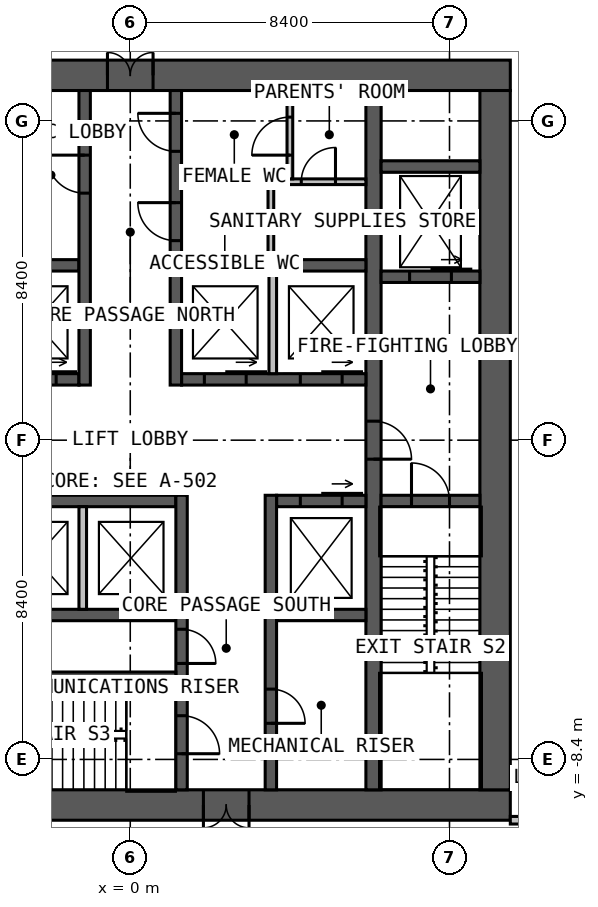
"""IFC4 building model, lengths in metres.
Left out: names, types, materials, properties, quantities, classifications, styles, units other than length and angle.
Written with IfcOpenShell. Run it as: python <this file> out.ifc"""

import sys

from ifc_helpers import new_model, si_unit, direction, frame, frame_2d, origin, place, context, subcontext, project, spatial, rectangle, extrude, element, fill, save


model = new_model("IFC4")
c1 = context("Model", 3, precision=1e-05, world=origin(), true_north=direction((0.0, 1.0)))
c2 = subcontext(c1, "Body", "Model", "MODEL_VIEW")
j1 = project(units=[si_unit("LENGTHUNIT", "METRE"), si_unit("PLANEANGLEUNIT", "RADIAN")], contexts=[c1])
p1 = place(None, origin())
s1 = spatial("IfcSite", under=j1, at=p1, CompositionType="ELEMENT")
p2 = place(p1, origin())
s2 = spatial("IfcBuilding", under=s1, at=p2, CompositionType="ELEMENT")
p3 = place(p2, frame((0.0, 0.0, 69.0)))
s3 = spatial("IfcBuildingStorey", under=s2, at=p3, CompositionType="ELEMENT", Elevation=69.0)
p4 = place(p3, frame((-10.0, 9.6, 0.0), z_axis=(0.0, 0.0, 1.0), x_axis=(1.0, 0.0, 0.0)))
e1 = element("IfcWall", 1, at=p4, inside=s3, PredefinedType="SOLIDWALL", context=c2, shape_type="SweptSolid", body=[
    extrude(rectangle(XDim=20.0, YDim=0.8, at=frame_2d((10.0, 0.0))), origin(), (0.0, 0.0, 1.0), 4.0),
])
p5 = place(p4, frame((9.4, 0.0, 0.0)))
e2 = element("IfcOpeningElement", 2, at=p5, cuts=e1, PredefinedType="OPENING", context=c2, shape_type="SweptSolid", body=[
    extrude(rectangle(XDim=1.2, YDim=2.2, at=frame_2d((0.6, 1.1))), frame((0.0, 0.41, 0.0), z_axis=(0.0, -1.0, 0.0), x_axis=(1.0, 0.0, 0.0)), (0.0, 0.0, 1.0), 0.82),
])
p6 = place(p3, frame((10.0, -9.6, 0.0), z_axis=(0.0, 0.0, 1.0), x_axis=(-1.0, 0.0, 0.0)))
e3 = element("IfcWall", 3, at=p6, inside=s3, PredefinedType="SOLIDWALL", context=c2, shape_type="SweptSolid", body=[
    extrude(rectangle(XDim=20.0, YDim=0.8, at=frame_2d((10.0, 0.0))), origin(), (0.0, 0.0, 1.0), 4.0),
])
p7 = place(p6, frame((6.875, 0.0, 0.0)))
e4 = element("IfcOpeningElement", 4, at=p7, cuts=e3, PredefinedType="OPENING", context=c2, shape_type="SweptSolid", body=[
    extrude(rectangle(XDim=1.2, YDim=2.2, at=frame_2d((0.6, 1.1))), frame((0.0, 0.41, 0.0), z_axis=(0.0, -1.0, 0.0), x_axis=(1.0, 0.0, 0.0)), (0.0, 0.0, 1.0), 0.82),
])
p8 = place(p3, frame((9.6, -9.2, 0.0), z_axis=(0.0, 0.0, 1.0), x_axis=(0.0, 1.0, 0.0)))
e5 = element("IfcWall", 5, at=p8, inside=s3, PredefinedType="SOLIDWALL", context=c2, shape_type="SweptSolid", body=[
    extrude(rectangle(XDim=18.4, YDim=0.8, at=frame_2d((9.2, 0.0))), origin(), (0.0, 0.0, 1.0), 4.0),
])
p9 = place(p3, frame((6.4, 9.2, 0.0), z_axis=(0.0, 0.0, 1.0), x_axis=(0.0, -1.0, 0.0)))
e6 = element("IfcWall", 6, at=p9, inside=s3, PredefinedType="SOLIDWALL", context=c2, shape_type="SweptSolid", body=[
    extrude(rectangle(XDim=18.4, YDim=0.4, at=frame_2d((9.2, 0.0))), origin(), (0.0, 0.0, 1.0), 4.0),
])
p10 = place(p9, frame((8.7, 0.0, 0.0)))
e7 = element("IfcOpeningElement", 7, at=p10, cuts=e6, PredefinedType="OPENING", context=c2, shape_type="SweptSolid", body=[
    extrude(rectangle(XDim=1.0, YDim=2.2, at=frame_2d((0.5, 1.1))), frame((0.0, 0.21, 0.0), z_axis=(0.0, -1.0, 0.0), x_axis=(1.0, 0.0, 0.0)), (0.0, 0.0, 1.0), 0.42),
])
p11 = place(p3, frame((-6.2, 1.6, 0.0), z_axis=(0.0, 0.0, 1.0), x_axis=(1.0, 0.0, 0.0)))
e8 = element("IfcWall", 8, at=p11, inside=s3, PredefinedType="SOLIDWALL", context=c2, shape_type="SweptSolid", body=[
    extrude(rectangle(XDim=4.85, YDim=0.3, at=frame_2d((2.425, 0.0))), origin(), (0.0, 0.0, 1.0), 4.0),
])
p12 = place(p11, frame((0.625, 0.0, 0.0)))
e9 = element("IfcOpeningElement", 9, at=p12, cuts=e8, PredefinedType="OPENING", context=c2, shape_type="SweptSolid", body=[
    extrude(rectangle(XDim=1.1, YDim=2.2, at=frame_2d((0.55, 1.1))), frame((0.0, 0.16, 0.0), z_axis=(0.0, -1.0, 0.0), x_axis=(1.0, 0.0, 0.0)), (0.0, 0.0, 1.0), 0.32),
])
p13 = place(p11, frame((3.15, 0.0, 0.0)))
e10 = element("IfcOpeningElement", 10, at=p13, cuts=e8, PredefinedType="OPENING", context=c2, shape_type="SweptSolid", body=[
    extrude(rectangle(XDim=1.1, YDim=2.2, at=frame_2d((0.55, 1.1))), frame((0.0, 0.16, 0.0), z_axis=(0.0, -1.0, 0.0), x_axis=(1.0, 0.0, 0.0)), (0.0, 0.0, 1.0), 0.32),
])
p14 = place(p3, frame((1.35, 1.6, 0.0), z_axis=(0.0, 0.0, 1.0), x_axis=(1.0, 0.0, 0.0)))
e11 = element("IfcWall", 11, at=p14, inside=s3, PredefinedType="SOLIDWALL", context=c2, shape_type="SweptSolid", body=[
    extrude(rectangle(XDim=4.85, YDim=0.3, at=frame_2d((2.425, 0.0))), origin(), (0.0, 0.0, 1.0), 4.0),
])
p15 = place(p14, frame((0.6, 0.0, 0.0)))
e12 = element("IfcOpeningElement", 12, at=p15, cuts=e11, PredefinedType="OPENING", context=c2, shape_type="SweptSolid", body=[
    extrude(rectangle(XDim=1.1, YDim=2.2, at=frame_2d((0.55, 1.1))), frame((0.0, 0.16, 0.0), z_axis=(0.0, -1.0, 0.0), x_axis=(1.0, 0.0, 0.0)), (0.0, 0.0, 1.0), 0.32),
])
p16 = place(p14, frame((3.125, 0.0, 0.0)))
e13 = element("IfcOpeningElement", 13, at=p16, cuts=e11, PredefinedType="OPENING", context=c2, shape_type="SweptSolid", body=[
    extrude(rectangle(XDim=1.1, YDim=2.2, at=frame_2d((0.55, 1.1))), frame((0.0, 0.16, 0.0), z_axis=(0.0, -1.0, 0.0), x_axis=(1.0, 0.0, 0.0)), (0.0, 0.0, 1.0), 0.32),
])
for number, where, z_axis, x_axis in (
    (14, (-6.2, 4.6, 0.0), (0.0, 0.0, 1.0), (1.0, 0.0, 0.0)),
    (15, (1.35, 4.6, 0.0), (0.0, 0.0, 1.0), (1.0, 0.0, 0.0)),
):
    element("IfcWall", number, at=place(p3, frame(where, z_axis=z_axis, x_axis=x_axis)), inside=s3, PredefinedType="SOLIDWALL", context=c2, shape_type="SweptSolid", body=[
        extrude(rectangle(XDim=4.85, YDim=0.3, at=frame_2d((2.425, 0.0))), origin(), (0.0, 0.0, 1.0), 4.0),
    ])
p17 = place(p3, frame((-1.2, 1.45, 0.0), z_axis=(0.0, 0.0, 1.0), x_axis=(0.0, 1.0, 0.0)))
e16 = element("IfcWall", 16, at=p17, inside=s3, PredefinedType="SOLIDWALL", context=c2, shape_type="SweptSolid", body=[
    extrude(rectangle(XDim=7.75, YDim=0.3, at=frame_2d((3.875, 0.0))), origin(), (0.0, 0.0, 1.0), 4.0),
])
p18 = place(p17, frame((5.05, 0.0, 0.0)))
e17 = element("IfcOpeningElement", 17, at=p18, cuts=e16, PredefinedType="OPENING", context=c2, shape_type="SweptSolid", body=[
    extrude(rectangle(XDim=1.0, YDim=2.2, at=frame_2d((0.5, 1.1))), frame((0.0, 0.16, 0.0), z_axis=(0.0, -1.0, 0.0), x_axis=(1.0, 0.0, 0.0)), (0.0, 0.0, 1.0), 0.32),
])
p19 = place(p3, frame((1.2, 1.45, 0.0), z_axis=(0.0, 0.0, 1.0), x_axis=(0.0, 1.0, 0.0)))
e18 = element("IfcWall", 18, at=p19, inside=s3, PredefinedType="SOLIDWALL", context=c2, shape_type="SweptSolid", body=[
    extrude(rectangle(XDim=7.75, YDim=0.3, at=frame_2d((3.875, 0.0))), origin(), (0.0, 0.0, 1.0), 4.0),
])
p20 = place(p19, frame((3.8, 0.0, 0.0)))
e19 = element("IfcOpeningElement", 19, at=p20, cuts=e18, PredefinedType="OPENING", context=c2, shape_type="SweptSolid", body=[
    extrude(rectangle(XDim=1.0, YDim=2.2, at=frame_2d((0.5, 1.1))), frame((0.0, 0.16, 0.0), z_axis=(0.0, -1.0, 0.0), x_axis=(1.0, 0.0, 0.0)), (0.0, 0.0, 1.0), 0.32),
])
p21 = place(p19, frame((6.15, 0.0, 0.0)))
e20 = element("IfcOpeningElement", 20, at=p21, cuts=e18, PredefinedType="OPENING", context=c2, shape_type="SweptSolid", body=[
    extrude(rectangle(XDim=1.0, YDim=2.2, at=frame_2d((0.5, 1.1))), frame((0.0, 0.16, 0.0), z_axis=(0.0, -1.0, 0.0), x_axis=(1.0, 0.0, 0.0)), (0.0, 0.0, 1.0), 0.32),
])
p22 = place(p3, frame((-6.2, -1.6, 0.0), z_axis=(0.0, 0.0, 1.0), x_axis=(1.0, 0.0, 0.0)))
e21 = element("IfcWall", 21, at=p22, inside=s3, PredefinedType="SOLIDWALL", context=c2, shape_type="SweptSolid", body=[
    extrude(rectangle(XDim=7.4, YDim=0.3, at=frame_2d((3.7, 0.0))), origin(), (0.0, 0.0, 1.0), 4.0),
])
p23 = place(p3, frame((3.85, -1.6, 0.0), z_axis=(0.0, 0.0, 1.0), x_axis=(1.0, 0.0, 0.0)))
e22 = element("IfcWall", 22, at=p23, inside=s3, PredefinedType="SOLIDWALL", context=c2, shape_type="SweptSolid", body=[
    extrude(rectangle(XDim=2.35, YDim=0.3, at=frame_2d((1.175, 0.0))), origin(), (0.0, 0.0, 1.0), 4.0),
])
p24 = place(p23, frame((0.625, 0.0, 0.0)))
e23 = element("IfcOpeningElement", 23, at=p24, cuts=e22, PredefinedType="OPENING", context=c2, shape_type="SweptSolid", body=[
    extrude(rectangle(XDim=1.1, YDim=2.2, at=frame_2d((0.55, 1.1))), frame((0.0, 0.16, 0.0), z_axis=(0.0, -1.0, 0.0), x_axis=(1.0, 0.0, 0.0)), (0.0, 0.0, 1.0), 0.32),
])
p25 = place(p3, frame((-6.2, -4.6, 0.0), z_axis=(0.0, 0.0, 1.0), x_axis=(1.0, 0.0, 0.0)))
e24 = element("IfcWall", 24, at=p25, inside=s3, PredefinedType="SOLIDWALL", context=c2, shape_type="SweptSolid", body=[
    extrude(rectangle(XDim=7.4, YDim=0.3, at=frame_2d((3.7, 0.0))), origin(), (0.0, 0.0, 1.0), 4.0),
])
p26 = place(p3, frame((3.85, -4.6, 0.0), z_axis=(0.0, 0.0, 1.0), x_axis=(1.0, 0.0, 0.0)))
e25 = element("IfcWall", 25, at=p26, inside=s3, PredefinedType="SOLIDWALL", context=c2, shape_type="SweptSolid", body=[
    extrude(rectangle(XDim=2.35, YDim=0.3, at=frame_2d((1.175, 0.0))), origin(), (0.0, 0.0, 1.0), 4.0),
])
p27 = place(p3, frame((1.35, -1.45, 0.0), z_axis=(0.0, 0.0, 1.0), x_axis=(0.0, -1.0, 0.0)))
e26 = element("IfcWall", 26, at=p27, inside=s3, PredefinedType="SOLIDWALL", context=c2, shape_type="SweptSolid", body=[
    extrude(rectangle(XDim=7.75, YDim=0.3, at=frame_2d((3.875, 0.0))), origin(), (0.0, 0.0, 1.0), 4.0),
])
p28 = place(p27, frame((5.8, 0.0, 0.0)))
e27 = element("IfcOpeningElement", 27, at=p28, cuts=e26, PredefinedType="OPENING", context=c2, shape_type="SweptSolid", body=[
    extrude(rectangle(XDim=1.0, YDim=2.2, at=frame_2d((0.5, 1.1))), frame((0.0, 0.16, 0.0), z_axis=(0.0, -1.0, 0.0), x_axis=(1.0, 0.0, 0.0)), (0.0, 0.0, 1.0), 0.32),
])
p29 = place(p27, frame((3.525, 0.0, 0.0)))
e28 = element("IfcOpeningElement", 28, at=p29, cuts=e26, PredefinedType="OPENING", context=c2, shape_type="SweptSolid", body=[
    extrude(rectangle(XDim=0.9, YDim=2.2, at=frame_2d((0.45, 1.1))), frame((0.0, 0.16, 0.0), z_axis=(0.0, -1.0, 0.0), x_axis=(1.0, 0.0, 0.0)), (0.0, 0.0, 1.0), 0.32),
])
p30 = place(p3, frame((3.7, -1.45, 0.0), z_axis=(0.0, 0.0, 1.0), x_axis=(0.0, -1.0, 0.0)))
e29 = element("IfcWall", 29, at=p30, inside=s3, PredefinedType="SOLIDWALL", context=c2, shape_type="SweptSolid", body=[
    extrude(rectangle(XDim=7.75, YDim=0.3, at=frame_2d((3.875, 0.0))), origin(), (0.0, 0.0, 1.0), 4.0),
])
p31 = place(p30, frame((5.1, 0.0, 0.0)))
e30 = element("IfcOpeningElement", 30, at=p31, cuts=e29, PredefinedType="OPENING", context=c2, shape_type="SweptSolid", body=[
    extrude(rectangle(XDim=0.9, YDim=2.2, at=frame_2d((0.45, 1.1))), frame((0.0, 0.16, 0.0), z_axis=(0.0, -1.0, 0.0), x_axis=(1.0, 0.0, 0.0)), (0.0, 0.0, 1.0), 0.32),
])
p32 = place(p3, frame((-6.2, -6.2, 0.0), z_axis=(0.0, 0.0, 1.0), x_axis=(1.0, 0.0, 0.0)))
e31 = element("IfcWall", 31, at=p32, inside=s3, PredefinedType="SOLIDWALL", context=c2, shape_type="SweptSolid", body=[
    extrude(rectangle(XDim=7.4, YDim=0.2, at=frame_2d((3.7, 0.0))), origin(), (0.0, 0.0, 1.0), 4.0),
])
p33 = place(p3, frame((6.6, -1.6, 0.0), z_axis=(0.0, 0.0, 1.0), x_axis=(1.0, 0.0, 0.0)))
e32 = element("IfcWall", 32, at=p33, inside=s3, PredefinedType="SOLIDWALL", context=c2, shape_type="SweptSolid", body=[
    extrude(rectangle(XDim=2.6, YDim=0.3, at=frame_2d((1.3, 0.0))), origin(), (0.0, 0.0, 1.0), 4.0),
])
p34 = place(p33, frame((0.8, 0.0, 0.0)))
e33 = element("IfcOpeningElement", 33, at=p34, cuts=e32, PredefinedType="OPENING", context=c2, shape_type="SweptSolid", body=[
    extrude(rectangle(XDim=1.0, YDim=2.2, at=frame_2d((0.5, 1.1))), frame((0.0, 0.16, 0.0), z_axis=(0.0, -1.0, 0.0), x_axis=(1.0, 0.0, 0.0)), (0.0, 0.0, 1.0), 0.32),
])
p35 = place(p3, frame((6.6, 4.3, 0.0), z_axis=(0.0, 0.0, 1.0), x_axis=(1.0, 0.0, 0.0)))
e34 = element("IfcWall", 34, at=p35, inside=s3, PredefinedType="SOLIDWALL", context=c2, shape_type="SweptSolid", body=[
    extrude(rectangle(XDim=2.6, YDim=0.3, at=frame_2d((1.3, 0.0))), origin(), (0.0, 0.0, 1.0), 4.0),
])
p36 = place(p35, frame((0.75, 0.0, 0.0)))
e35 = element("IfcOpeningElement", 35, at=p36, cuts=e34, PredefinedType="OPENING", context=c2, shape_type="SweptSolid", body=[
    extrude(rectangle(XDim=1.1, YDim=2.2, at=frame_2d((0.55, 1.1))), frame((0.0, 0.16, 0.0), z_axis=(0.0, -1.0, 0.0), x_axis=(1.0, 0.0, 0.0)), (0.0, 0.0, 1.0), 0.32),
])
p37 = place(p3, frame((6.6, 7.2, 0.0), z_axis=(0.0, 0.0, 1.0), x_axis=(1.0, 0.0, 0.0)))
e36 = element("IfcWall", 36, at=p37, inside=s3, PredefinedType="SOLIDWALL", context=c2, shape_type="SweptSolid", body=[
    extrude(rectangle(XDim=2.6, YDim=0.3, at=frame_2d((1.3, 0.0))), origin(), (0.0, 0.0, 1.0), 4.0),
])
for number, where, z_axis, x_axis in (
    (37, (3.75, 1.75, 0.0), (0.0, 0.0, 1.0), (0.0, 1.0, 0.0)),
    (38, (-1.25, -1.75, 0.0), (0.0, 0.0, 1.0), (0.0, -1.0, 0.0)),
):
    element("IfcWall", number, at=place(p3, frame(where, z_axis=z_axis, x_axis=x_axis)), inside=s3, PredefinedType="SOLIDWALL", context=c2, shape_type="SweptSolid", body=[
        extrude(rectangle(XDim=2.7, YDim=0.2, at=frame_2d((1.35, 0.0))), origin(), (0.0, 0.0, 1.0), 3.75),
    ])
p38 = place(p3, frame((1.35, 6.8, 0.0), z_axis=(0.0, 0.0, 1.0), x_axis=(1.0, 0.0, 0.0)))
e39 = element("IfcWall", 39, at=p38, inside=s3, PredefinedType="PARTITIONING", context=c2, shape_type="SweptSolid", body=[
    extrude(rectangle(XDim=4.85, YDim=0.15, at=frame_2d((2.425, 0.0))), origin(), (0.0, 0.0, 1.0), 3.75),
])
p39 = place(p38, frame((3.15, 0.0, 0.0)))
e40 = element("IfcOpeningElement", 40, at=p39, cuts=e39, PredefinedType="OPENING", context=c2, shape_type="SweptSolid", body=[
    extrude(rectangle(XDim=0.9, YDim=2.2, at=frame_2d((0.45, 1.1))), frame((0.0, 0.085, 0.0), z_axis=(0.0, -1.0, 0.0), x_axis=(1.0, 0.0, 0.0)), (0.0, 0.0, 1.0), 0.17),
])
p40 = place(p3, frame((3.7, 4.75, 0.0), z_axis=(0.0, 0.0, 1.0), x_axis=(0.0, 1.0, 0.0)))
e41 = element("IfcWall", 41, at=p40, inside=s3, PredefinedType="PARTITIONING", context=c2, shape_type="SweptSolid", body=[
    extrude(rectangle(XDim=1.975, YDim=0.15, at=frame_2d((0.988, 0.0))), origin(), (0.0, 0.0, 1.0), 3.75),
])
p41 = place(p3, frame((4.2, 6.875, 0.0), z_axis=(0.0, 0.0, 1.0), x_axis=(0.0, 1.0, 0.0)))
e42 = element("IfcWall", 42, at=p41, inside=s3, PredefinedType="PARTITIONING", context=c2, shape_type="SweptSolid", body=[
    extrude(rectangle(XDim=2.325, YDim=0.15, at=frame_2d((1.163, 0.0))), origin(), (0.0, 0.0, 1.0), 3.75),
])
p42 = place(p41, frame((0.625, 0.0, 0.0)))
e43 = element("IfcOpeningElement", 43, at=p42, cuts=e42, PredefinedType="OPENING", context=c2, shape_type="SweptSolid", body=[
    extrude(rectangle(XDim=1.0, YDim=2.2, at=frame_2d((0.5, 1.1))), frame((0.0, 0.085, 0.0), z_axis=(0.0, -1.0, 0.0), x_axis=(1.0, 0.0, 0.0)), (0.0, 0.0, 1.0), 0.17),
])
p43 = place(p3, frame((10.0, -10.0, 0.0), z_axis=(0.0, 0.0, 1.0), x_axis=(1.0, 0.0, 0.0)))
e44 = element("IfcWall", 44, at=p43, inside=s3, PredefinedType="PARTITIONING", context=c2, shape_type="SweptSolid", body=[
    extrude(rectangle(XDim=2.0, YDim=0.2, at=frame_2d((1.0, 0.0))), origin(), (0.0, 0.0, 1.0), 3.8),
])
p44 = place(p43, frame((0.5, 0.0, 0.0)))
e45 = element("IfcOpeningElement", 45, at=p44, cuts=e44, PredefinedType="OPENING", context=c2, shape_type="SweptSolid", body=[
    extrude(rectangle(XDim=1.0, YDim=2.2, at=frame_2d((0.5, 1.1))), frame((0.0, 0.11, 0.0), z_axis=(0.0, -1.0, 0.0), x_axis=(1.0, 0.0, 0.0)), (0.0, 0.0, 1.0), 0.22),
])
p45 = place(p5, origin())
e46 = element("IfcDoor", 46, at=p45, inside=s3, OperationType="DOUBLE_DOOR_SINGLE_SWING", PredefinedType="DOOR", context=c2, shape_type="SweptSolid", body=[
    extrude(rectangle(XDim=1.2, YDim=2.2, at=frame_2d((0.6, 1.1))), frame((0.0, 0.025, 0.0), z_axis=(0.0, -1.0, 0.0), x_axis=(1.0, 0.0, 0.0)), (0.0, 0.0, 1.0), 0.05),
])
fill(e2, e46)
p46 = place(p7, origin())
e47 = element("IfcDoor", 47, at=p46, inside=s3, OperationType="DOUBLE_DOOR_SINGLE_SWING", PredefinedType="DOOR", context=c2, shape_type="SweptSolid", body=[
    extrude(rectangle(XDim=1.2, YDim=2.2, at=frame_2d((0.6, 1.1))), frame((0.0, 0.025, 0.0), z_axis=(0.0, -1.0, 0.0), x_axis=(1.0, 0.0, 0.0)), (0.0, 0.0, 1.0), 0.05),
])
fill(e4, e47)
p47 = place(p10, origin())
e48 = element("IfcDoor", 48, at=p47, inside=s3, OperationType="SINGLE_SWING_RIGHT", PredefinedType="DOOR", context=c2, shape_type="SweptSolid", body=[
    extrude(rectangle(XDim=1.0, YDim=2.2, at=frame_2d((0.5, 1.1))), frame((0.0, 0.025, 0.0), z_axis=(0.0, -1.0, 0.0), x_axis=(1.0, 0.0, 0.0)), (0.0, 0.0, 1.0), 0.05),
])
fill(e7, e48)
p48 = place(p34, origin())
e49 = element("IfcDoor", 49, at=p48, inside=s3, OperationType="SINGLE_SWING_LEFT", PredefinedType="DOOR", context=c2, shape_type="SweptSolid", body=[
    extrude(rectangle(XDim=1.0, YDim=2.2, at=frame_2d((0.5, 1.1))), frame((0.0, 0.025, 0.0), z_axis=(0.0, -1.0, 0.0), x_axis=(1.0, 0.0, 0.0)), (0.0, 0.0, 1.0), 0.05),
])
fill(e33, e49)
p49 = place(p28, origin())
e50 = element("IfcDoor", 50, at=p49, inside=s3, OperationType="SINGLE_SWING_RIGHT", PredefinedType="DOOR", context=c2, shape_type="SweptSolid", body=[
    extrude(rectangle(XDim=1.0, YDim=2.2, at=frame_2d((0.5, 1.1))), frame((0.0, 0.025, 0.0), z_axis=(0.0, -1.0, 0.0), x_axis=(1.0, 0.0, 0.0)), (0.0, 0.0, 1.0), 0.05),
])
fill(e27, e50)
p50 = place(p18, origin())
e51 = element("IfcDoor", 51, at=p50, inside=s3, OperationType="SINGLE_SWING_RIGHT", PredefinedType="DOOR", context=c2, shape_type="SweptSolid", body=[
    extrude(rectangle(XDim=1.0, YDim=2.2, at=frame_2d((0.5, 1.1))), frame((0.0, 0.025, 0.0), z_axis=(0.0, -1.0, 0.0), x_axis=(1.0, 0.0, 0.0)), (0.0, 0.0, 1.0), 0.05),
])
fill(e17, e51)
p51 = place(p20, origin())
e52 = element("IfcDoor", 52, at=p51, inside=s3, OperationType="SINGLE_SWING_RIGHT", PredefinedType="DOOR", context=c2, shape_type="SweptSolid", body=[
    extrude(rectangle(XDim=1.0, YDim=2.2, at=frame_2d((0.5, 1.1))), frame((0.0, 0.025, 0.0), z_axis=(0.0, -1.0, 0.0), x_axis=(1.0, 0.0, 0.0)), (0.0, 0.0, 1.0), 0.05),
])
fill(e19, e52)
p52 = place(p21, origin())
e53 = element("IfcDoor", 53, at=p52, inside=s3, OperationType="SINGLE_SWING_RIGHT", PredefinedType="DOOR", context=c2, shape_type="SweptSolid", body=[
    extrude(rectangle(XDim=1.0, YDim=2.2, at=frame_2d((0.5, 1.1))), frame((0.0, 0.025, 0.0), z_axis=(0.0, -1.0, 0.0), x_axis=(1.0, 0.0, 0.0)), (0.0, 0.0, 1.0), 0.05),
])
fill(e20, e53)
p53 = place(p29, origin())
e54 = element("IfcDoor", 54, at=p53, inside=s3, OperationType="SINGLE_SWING_RIGHT", PredefinedType="DOOR", context=c2, shape_type="SweptSolid", body=[
    extrude(rectangle(XDim=0.9, YDim=2.2, at=frame_2d((0.45, 1.1))), frame((0.0, 0.025, 0.0), z_axis=(0.0, -1.0, 0.0), x_axis=(1.0, 0.0, 0.0)), (0.0, 0.0, 1.0), 0.05),
])
fill(e28, e54)
p54 = place(p31, origin())
e55 = element("IfcDoor", 55, at=p54, inside=s3, OperationType="SINGLE_SWING_RIGHT", PredefinedType="DOOR", context=c2, shape_type="SweptSolid", body=[
    extrude(rectangle(XDim=0.9, YDim=2.2, at=frame_2d((0.45, 1.1))), frame((0.0, 0.025, 0.0), z_axis=(0.0, -1.0, 0.0), x_axis=(1.0, 0.0, 0.0)), (0.0, 0.0, 1.0), 0.05),
])
fill(e30, e55)
p55 = place(p39, origin())
e56 = element("IfcDoor", 56, at=p55, inside=s3, OperationType="SINGLE_SWING_RIGHT", PredefinedType="DOOR", context=c2, shape_type="SweptSolid", body=[
    extrude(rectangle(XDim=0.9, YDim=2.2, at=frame_2d((0.45, 1.1))), frame((0.0, 0.025, 0.0), z_axis=(0.0, -1.0, 0.0), x_axis=(1.0, 0.0, 0.0)), (0.0, 0.0, 1.0), 0.05),
])
fill(e40, e56)
p56 = place(p42, origin())
e57 = element("IfcDoor", 57, at=p56, inside=s3, OperationType="SINGLE_SWING_LEFT", PredefinedType="DOOR", context=c2, shape_type="SweptSolid", body=[
    extrude(rectangle(XDim=1.0, YDim=2.2, at=frame_2d((0.5, 1.1))), frame((0.0, 0.025, 0.0), z_axis=(0.0, -1.0, 0.0), x_axis=(1.0, 0.0, 0.0)), (0.0, 0.0, 1.0), 0.05),
])
fill(e43, e57)
p57 = place(p13, origin())
e58 = element("IfcDoor", 58, at=p57, inside=s3, OperationType="SLIDING_TO_LEFT", PredefinedType="DOOR", context=c2, shape_type="SweptSolid", body=[
    extrude(rectangle(XDim=1.1, YDim=2.2, at=frame_2d((0.55, 1.1))), frame((0.0, 0.025, 0.0), z_axis=(0.0, -1.0, 0.0), x_axis=(1.0, 0.0, 0.0)), (0.0, 0.0, 1.0), 0.05),
])
fill(e10, e58)
p58 = place(p15, origin())
e59 = element("IfcDoor", 59, at=p58, inside=s3, OperationType="SLIDING_TO_LEFT", PredefinedType="DOOR", context=c2, shape_type="SweptSolid", body=[
    extrude(rectangle(XDim=1.1, YDim=2.2, at=frame_2d((0.55, 1.1))), frame((0.0, 0.025, 0.0), z_axis=(0.0, -1.0, 0.0), x_axis=(1.0, 0.0, 0.0)), (0.0, 0.0, 1.0), 0.05),
])
fill(e12, e59)
p59 = place(p16, origin())
e60 = element("IfcDoor", 60, at=p59, inside=s3, OperationType="SLIDING_TO_LEFT", PredefinedType="DOOR", context=c2, shape_type="SweptSolid", body=[
    extrude(rectangle(XDim=1.1, YDim=2.2, at=frame_2d((0.55, 1.1))), frame((0.0, 0.025, 0.0), z_axis=(0.0, -1.0, 0.0), x_axis=(1.0, 0.0, 0.0)), (0.0, 0.0, 1.0), 0.05),
])
fill(e13, e60)
p60 = place(p24, origin())
e61 = element("IfcDoor", 61, at=p60, inside=s3, OperationType="SLIDING_TO_LEFT", PredefinedType="DOOR", context=c2, shape_type="SweptSolid", body=[
    extrude(rectangle(XDim=1.1, YDim=2.2, at=frame_2d((0.55, 1.1))), frame((0.0, 0.025, 0.0), z_axis=(0.0, -1.0, 0.0), x_axis=(1.0, 0.0, 0.0)), (0.0, 0.0, 1.0), 0.05),
])
fill(e23, e61)
p61 = place(p36, origin())
e62 = element("IfcDoor", 62, at=p61, inside=s3, OperationType="SLIDING_TO_LEFT", PredefinedType="DOOR", context=c2, shape_type="SweptSolid", body=[
    extrude(rectangle(XDim=1.1, YDim=2.2, at=frame_2d((0.55, 1.1))), frame((0.0, 0.025, 0.0), z_axis=(0.0, -1.0, 0.0), x_axis=(1.0, 0.0, 0.0)), (0.0, 0.0, 1.0), 0.05),
])
fill(e35, e62)
save(model, sys.argv[1])
